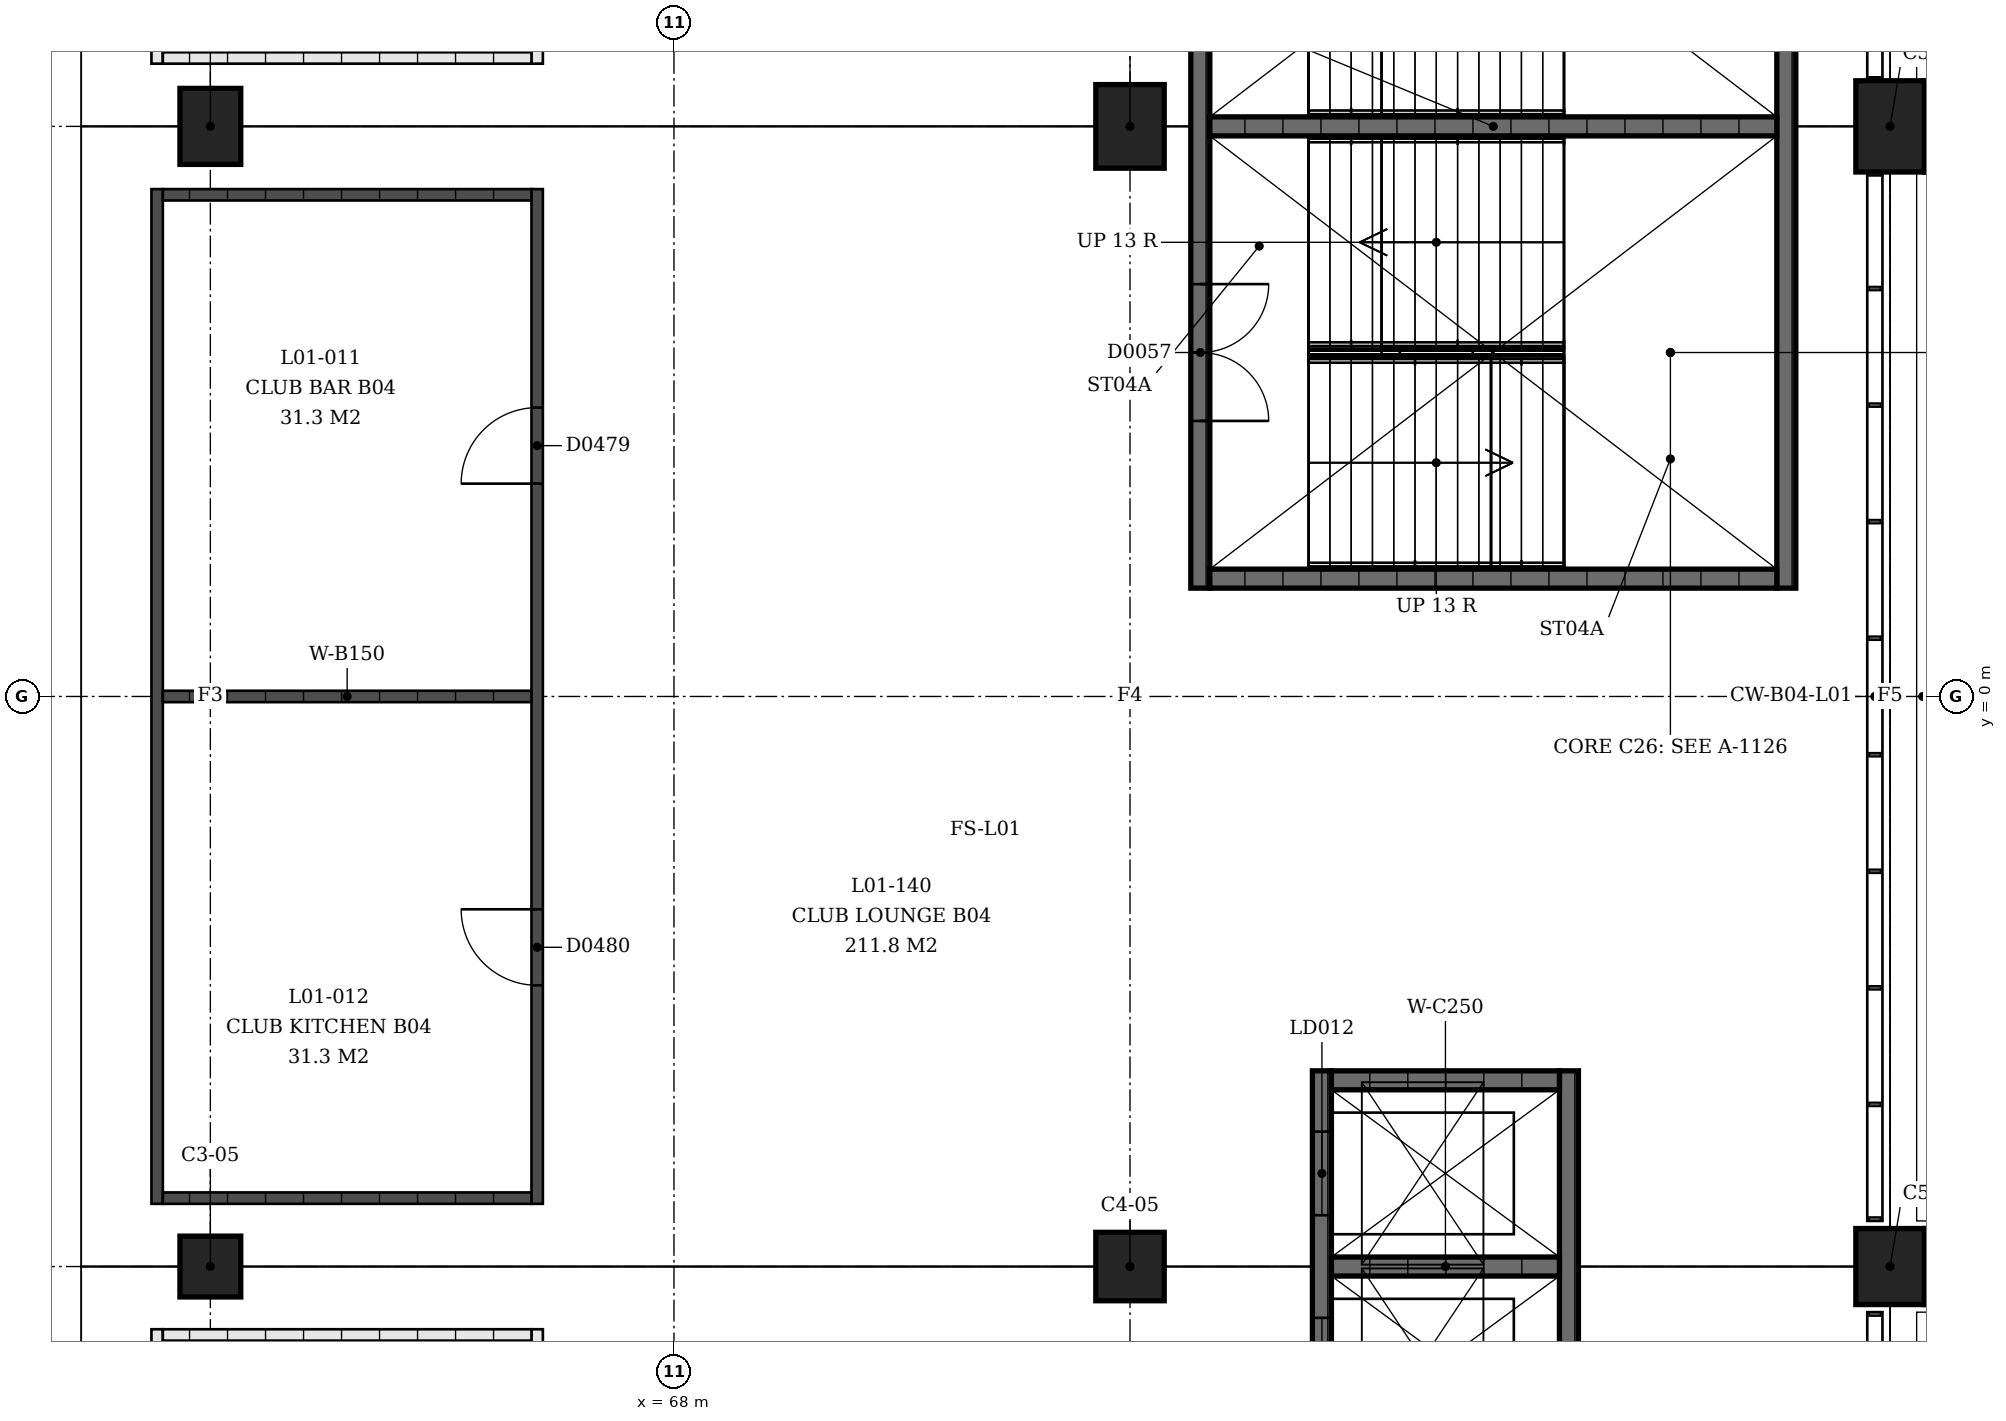
"""IFC4 building model, lengths in metres.
Left out: names, types, materials, properties, quantities, classifications, styles, units other than length and angle.
Written with IfcOpenShell. Run it as: python <this file> out.ifc"""

import sys

from ifc_helpers import new_model, si_unit, direction, frame, frame_2d, origin, origin_2d, place, context, subcontext, project, spatial, rectangle, extrude, element, fill, save


model = new_model("IFC4")
c1 = context("Model", 3, precision=1e-05, world=origin(), true_north=direction((0.0, 1.0)))
c2 = subcontext(c1, "Body", "Model", "MODEL_VIEW")
j1 = project(units=[si_unit("LENGTHUNIT", "METRE"), si_unit("PLANEANGLEUNIT", "RADIAN")], contexts=[c1])
p1 = place(None, origin())
s1 = spatial("IfcSite", under=j1, at=p1, CompositionType="ELEMENT")
p2 = place(p1, origin())
s2 = spatial("IfcBuilding", under=s1, at=p2, CompositionType="ELEMENT")
p3 = place(p2, frame((0.0, 0.0, 4.5)))
s3 = spatial("IfcBuildingStorey", under=s2, at=p3, CompositionType="ELEMENT", Elevation=4.5)
p4 = place(p3, frame((61.9, 7.5, 0.0), z_axis=(0.0, 0.0, 1.0), x_axis=(0.0, 1.0, 0.0)))
e1 = element("IfcColumn", 1, at=p4, inside=s3, PredefinedType="COLUMN", context=c2, shape_type="SweptSolid", body=[
    extrude(rectangle(XDim=1.0, YDim=0.8, at=origin_2d()), origin(), (0.0, 0.0, 1.0), 4.5),
])
p5 = place(p3, frame((74.0, 7.5, 0.0), z_axis=(0.0, 0.0, 1.0), x_axis=(0.0, 1.0, 0.0)))
e2 = element("IfcColumn", 2, at=p5, inside=s3, PredefinedType="COLUMN", context=c2, shape_type="SweptSolid", body=[
    extrude(rectangle(XDim=1.1, YDim=0.9, at=origin_2d()), origin(), (0.0, 0.0, 1.0), 4.5),
])
p6 = place(p3, frame((84.0, 7.5, 0.0), z_axis=(0.0, 0.0, 1.0), x_axis=(0.0, 1.0, 0.0)))
e3 = element("IfcColumn", 3, at=p6, inside=s3, PredefinedType="COLUMN", context=c2, shape_type="SweptSolid", body=[
    extrude(rectangle(XDim=1.2, YDim=0.9, at=origin_2d()), origin(), (0.0, 0.0, 1.0), 4.5),
])
p7 = place(p3, frame((61.9, -7.5, 0.0), z_axis=(0.0, 0.0, 1.0), x_axis=(0.0, 1.0, 0.0)))
e4 = element("IfcColumn", 4, at=p7, inside=s3, PredefinedType="COLUMN", context=c2, shape_type="SweptSolid", body=[
    extrude(rectangle(XDim=0.8, YDim=0.8, at=origin_2d()), origin(), (0.0, 0.0, 1.0), 4.5),
])
p8 = place(p3, frame((74.0, -7.5, 0.0), z_axis=(0.0, 0.0, 1.0), x_axis=(0.0, 1.0, 0.0)))
e5 = element("IfcColumn", 5, at=p8, inside=s3, PredefinedType="COLUMN", context=c2, shape_type="SweptSolid", body=[
    extrude(rectangle(XDim=0.9, YDim=0.9, at=origin_2d()), origin(), (0.0, 0.0, 1.0), 4.5),
])
p9 = place(p3, frame((84.0, -7.5, 0.0), z_axis=(0.0, 0.0, 1.0), x_axis=(0.0, 1.0, 0.0)))
e6 = element("IfcColumn", 6, at=p9, inside=s3, PredefinedType="COLUMN", context=c2, shape_type="SweptSolid", body=[
    extrude(rectangle(XDim=1.0, YDim=0.9, at=origin_2d()), origin(), (0.0, 0.0, 1.0), 4.5),
])
p10 = place(p3, frame((74.925, 1.425, 0.0), z_axis=(0.0, 0.0, 1.0), x_axis=(0.0, 1.0, 0.0)))
e7 = element("IfcWall", 7, at=p10, inside=s3, PredefinedType="SHEAR", context=c2, shape_type="SweptSolid", body=[
    extrude(rectangle(XDim=12.15, YDim=0.25, at=frame_2d((6.075, 0.0))), origin(), (0.0, 0.0, 1.0), 4.09),
])
p11 = place(p10, frame((2.2, 0.0, 0.0)))
e8 = element("IfcOpeningElement", 8, at=p11, cuts=e7, PredefinedType="OPENING", context=c2, shape_type="SweptSolid", body=[
    extrude(rectangle(XDim=1.8, YDim=2.1, at=frame_2d((0.9, 1.05))), frame((0.0, 0.125, 0.0), z_axis=(0.0, -1.0, 0.0), x_axis=(1.0, 0.0, 0.0)), (0.0, 0.0, 1.0), 0.25),
])
p12 = place(p10, frame((8.15, 0.0, 0.0)))
e9 = element("IfcOpeningElement", 9, at=p12, cuts=e7, PredefinedType="OPENING", context=c2, shape_type="SweptSolid", body=[
    extrude(rectangle(XDim=1.8, YDim=2.1, at=frame_2d((0.9, 1.05))), frame((0.0, 0.125, 0.0), z_axis=(0.0, -1.0, 0.0), x_axis=(1.0, 0.0, 0.0)), (0.0, 0.0, 1.0), 0.25),
])
p13 = place(p3, frame((82.635, 1.425, 0.0), z_axis=(0.0, 0.0, 1.0), x_axis=(0.0, 1.0, 0.0)))
e10 = element("IfcWall", 10, at=p13, inside=s3, PredefinedType="SHEAR", context=c2, shape_type="SweptSolid", body=[
    extrude(rectangle(XDim=12.15, YDim=0.25, at=frame_2d((6.075, 0.0))), origin(), (0.0, 0.0, 1.0), 4.09),
])
for number, where, z_axis, x_axis in (
    (11, (75.05, 1.55, 0.0), (0.0, 0.0, 1.0), (1.0, 0.0, 0.0)),
    (12, (75.05, 7.5, 0.0), (0.0, 0.0, 1.0), (1.0, 0.0, 0.0)),
):
    element("IfcWall", number, at=place(p3, frame(where, z_axis=z_axis, x_axis=x_axis)), inside=s3, PredefinedType="SHEAR", context=c2, shape_type="SweptSolid", body=[
        extrude(rectangle(XDim=7.46, YDim=0.25, at=frame_2d((3.73, 0.0))), origin(), (0.0, 0.0, 1.0), 4.09),
    ])
p14 = place(p3, frame((76.525, -10.075, 0.0), z_axis=(0.0, 0.0, 1.0), x_axis=(0.0, 1.0, 0.0)))
e13 = element("IfcWall", 13, at=p14, inside=s3, PredefinedType="SHEAR", context=c2, shape_type="SweptSolid", body=[
    extrude(rectangle(XDim=5.15, YDim=0.25, at=frame_2d((2.575, 0.0))), origin(), (0.0, 0.0, 1.0), 4.09),
])
p15 = place(p14, frame((0.8, 0.0, 0.0)))
e14 = element("IfcOpeningElement", 14, at=p15, cuts=e13, PredefinedType="OPENING", context=c2, shape_type="SweptSolid", body=[
    extrude(rectangle(XDim=1.1, YDim=2.1, at=frame_2d((0.55, 1.05))), frame((0.0, 0.125, 0.0), z_axis=(0.0, -1.0, 0.0), x_axis=(1.0, 0.0, 0.0)), (0.0, 0.0, 1.0), 0.25),
])
p16 = place(p14, frame((3.25, 0.0, 0.0)))
e15 = element("IfcOpeningElement", 15, at=p16, cuts=e13, PredefinedType="OPENING", context=c2, shape_type="SweptSolid", body=[
    extrude(rectangle(XDim=1.1, YDim=2.1, at=frame_2d((0.55, 1.05))), frame((0.0, 0.125, 0.0), z_axis=(0.0, -1.0, 0.0), x_axis=(1.0, 0.0, 0.0)), (0.0, 0.0, 1.0), 0.25),
])
p17 = place(p3, frame((79.775, -10.075, 0.0), z_axis=(0.0, 0.0, 1.0), x_axis=(0.0, 1.0, 0.0)))
e16 = element("IfcWall", 16, at=p17, inside=s3, PredefinedType="SHEAR", context=c2, shape_type="SweptSolid", body=[
    extrude(rectangle(XDim=5.15, YDim=0.25, at=frame_2d((2.575, 0.0))), origin(), (0.0, 0.0, 1.0), 4.09),
])
for number, where, z_axis, x_axis in (
    (17, (76.65, -5.05, 0.0), (0.0, 0.0, 1.0), (1.0, 0.0, 0.0)),
    (18, (76.65, -7.5, 0.0), (0.0, 0.0, 1.0), (1.0, 0.0, 0.0)),
):
    element("IfcWall", number, at=place(p3, frame(where, z_axis=z_axis, x_axis=x_axis)), inside=s3, PredefinedType="SHEAR", context=c2, shape_type="SweptSolid", body=[
        extrude(rectangle(XDim=3.0, YDim=0.25, at=frame_2d((1.5, 0.0))), origin(), (0.0, 0.0, 1.0), 4.09),
    ])
p18 = place(p3, frame((61.2, 8.325, 0.0), z_axis=(0.0, 0.0, 1.0), x_axis=(0.0, 1.0, 0.0)))
e19 = element("IfcWall", 19, at=p18, inside=s3, PredefinedType="PARTITIONING", context=c2, shape_type="SweptSolid", body=[
    extrude(rectangle(XDim=13.35, YDim=0.15, at=frame_2d((6.675, 0.0))), origin(), (0.0, 0.0, 1.0), 3.0),
])
p19 = place(p3, frame((66.2, 8.325, 0.0), z_axis=(0.0, 0.0, 1.0), x_axis=(0.0, 1.0, 0.0)))
e20 = element("IfcWall", 20, at=p19, inside=s3, PredefinedType="PARTITIONING", context=c2, shape_type="SweptSolid", body=[
    extrude(rectangle(XDim=13.35, YDim=0.15, at=frame_2d((6.675, 0.0))), origin(), (0.0, 0.0, 1.0), 3.0),
])
p20 = place(p19, frame((1.671, 0.0, 0.0)))
e21 = element("IfcOpeningElement", 21, at=p20, cuts=e20, PredefinedType="OPENING", context=c2, shape_type="SweptSolid", body=[
    extrude(rectangle(XDim=0.9, YDim=2.1, at=frame_2d((0.45, 1.05))), frame((0.0, 0.075, 0.0), z_axis=(0.0, -1.0, 0.0), x_axis=(1.0, 0.0, 0.0)), (0.0, 0.0, 1.0), 0.15),
])
p21 = place(p19, frame((5.763, 0.0, 0.0)))
e22 = element("IfcOpeningElement", 22, at=p21, cuts=e20, PredefinedType="OPENING", context=c2, shape_type="SweptSolid", body=[
    extrude(rectangle(XDim=0.9, YDim=2.1, at=frame_2d((0.45, 1.05))), frame((0.0, 0.075, 0.0), z_axis=(0.0, -1.0, 0.0), x_axis=(1.0, 0.0, 0.0)), (0.0, 0.0, 1.0), 0.15),
])
p22 = place(p19, frame((8.963, 0.0, 0.0)))
e23 = element("IfcOpeningElement", 23, at=p22, cuts=e20, PredefinedType="OPENING", context=c2, shape_type="SweptSolid", body=[
    extrude(rectangle(XDim=1.1, YDim=2.1, at=frame_2d((0.55, 1.05))), frame((0.0, 0.075, 0.0), z_axis=(0.0, -1.0, 0.0), x_axis=(1.0, 0.0, 0.0)), (0.0, 0.0, 1.0), 0.15),
])
p23 = place(p19, frame((11.471, 0.0, 0.0)))
e24 = element("IfcOpeningElement", 24, at=p23, cuts=e20, PredefinedType="OPENING", context=c2, shape_type="SweptSolid", body=[
    extrude(rectangle(XDim=1.1, YDim=2.1, at=frame_2d((0.55, 1.05))), frame((0.0, 0.075, 0.0), z_axis=(0.0, -1.0, 0.0), x_axis=(1.0, 0.0, 0.0)), (0.0, 0.0, 1.0), 0.15),
])
p24 = place(p3, frame((61.275, 8.4, 0.0), z_axis=(0.0, 0.0, 1.0), x_axis=(1.0, 0.0, 0.0)))
e25 = element("IfcWall", 25, at=p24, inside=s3, PredefinedType="PARTITIONING", context=c2, shape_type="SweptSolid", body=[
    extrude(rectangle(XDim=4.85, YDim=0.15, at=frame_2d((2.425, 0.0))), origin(), (0.0, 0.0, 1.0), 3.0),
])
p25 = place(p3, frame((61.2, 6.675, 0.0), z_axis=(0.0, 0.0, 1.0), x_axis=(0.0, -1.0, 0.0)))
e26 = element("IfcWall", 26, at=p25, inside=s3, PredefinedType="SOLIDWALL", context=c2, shape_type="SweptSolid", body=[
    extrude(rectangle(XDim=13.35, YDim=0.15, at=frame_2d((6.675, 0.0))), origin(), (0.0, 0.0, 1.0), 3.0),
])
p26 = place(p3, frame((66.2, 6.675, 0.0), z_axis=(0.0, 0.0, 1.0), x_axis=(0.0, -1.0, 0.0)))
e27 = element("IfcWall", 27, at=p26, inside=s3, PredefinedType="SOLIDWALL", context=c2, shape_type="SweptSolid", body=[
    extrude(rectangle(XDim=13.35, YDim=0.15, at=frame_2d((6.675, 0.0))), origin(), (0.0, 0.0, 1.0), 3.0),
])
p27 = place(p26, frame((2.875, 0.0, 0.0)))
e28 = element("IfcOpeningElement", 28, at=p27, cuts=e27, PredefinedType="OPENING", context=c2, shape_type="SweptSolid", body=[
    extrude(rectangle(XDim=1.0, YDim=2.1, at=frame_2d((0.5, 1.05))), frame((0.0, 0.075, 0.0), z_axis=(0.0, -1.0, 0.0), x_axis=(1.0, 0.0, 0.0)), (0.0, 0.0, 1.0), 0.15),
])
p28 = place(p26, frame((9.475, 0.0, 0.0)))
e29 = element("IfcOpeningElement", 29, at=p28, cuts=e27, PredefinedType="OPENING", context=c2, shape_type="SweptSolid", body=[
    extrude(rectangle(XDim=1.0, YDim=2.1, at=frame_2d((0.5, 1.05))), frame((0.0, 0.075, 0.0), z_axis=(0.0, -1.0, 0.0), x_axis=(1.0, 0.0, 0.0)), (0.0, 0.0, 1.0), 0.15),
])
for number, where, z_axis, x_axis in (
    (30, (61.275, 6.6, 0.0), (0.0, 0.0, 1.0), (1.0, 0.0, 0.0)),
    (31, (61.275, 0.0, 0.0), (0.0, 0.0, 1.0), (1.0, 0.0, 0.0)),
    (32, (61.275, -6.6, 0.0), (0.0, 0.0, 1.0), (1.0, 0.0, 0.0)),
):
    element("IfcWall", number, at=place(p3, frame(where, z_axis=z_axis, x_axis=x_axis)), inside=s3, PredefinedType="SOLIDWALL", context=c2, shape_type="SweptSolid", body=[
        extrude(rectangle(XDim=4.85, YDim=0.15, at=frame_2d((2.425, 0.0))), origin(), (0.0, 0.0, 1.0), 3.0),
    ])
p29 = place(p3, frame((61.2, -21.675, 0.0), z_axis=(0.0, 0.0, 1.0), x_axis=(0.0, 1.0, 0.0)))
e33 = element("IfcWall", 33, at=p29, inside=s3, PredefinedType="PARTITIONING", context=c2, shape_type="SweptSolid", body=[
    extrude(rectangle(XDim=13.35, YDim=0.15, at=frame_2d((6.675, 0.0))), origin(), (0.0, 0.0, 1.0), 3.0),
])
p30 = place(p3, frame((66.2, -21.675, 0.0), z_axis=(0.0, 0.0, 1.0), x_axis=(0.0, 1.0, 0.0)))
e34 = element("IfcWall", 34, at=p30, inside=s3, PredefinedType="PARTITIONING", context=c2, shape_type="SweptSolid", body=[
    extrude(rectangle(XDim=13.35, YDim=0.15, at=frame_2d((6.675, 0.0))), origin(), (0.0, 0.0, 1.0), 3.0),
])
p31 = place(p30, frame((1.671, 0.0, 0.0)))
e35 = element("IfcOpeningElement", 35, at=p31, cuts=e34, PredefinedType="OPENING", context=c2, shape_type="SweptSolid", body=[
    extrude(rectangle(XDim=0.9, YDim=2.1, at=frame_2d((0.45, 1.05))), frame((0.0, 0.075, 0.0), z_axis=(0.0, -1.0, 0.0), x_axis=(1.0, 0.0, 0.0)), (0.0, 0.0, 1.0), 0.15),
])
p32 = place(p30, frame((5.763, 0.0, 0.0)))
e36 = element("IfcOpeningElement", 36, at=p32, cuts=e34, PredefinedType="OPENING", context=c2, shape_type="SweptSolid", body=[
    extrude(rectangle(XDim=0.9, YDim=2.1, at=frame_2d((0.45, 1.05))), frame((0.0, 0.075, 0.0), z_axis=(0.0, -1.0, 0.0), x_axis=(1.0, 0.0, 0.0)), (0.0, 0.0, 1.0), 0.15),
])
p33 = place(p30, frame((8.963, 0.0, 0.0)))
e37 = element("IfcOpeningElement", 37, at=p33, cuts=e34, PredefinedType="OPENING", context=c2, shape_type="SweptSolid", body=[
    extrude(rectangle(XDim=1.1, YDim=2.1, at=frame_2d((0.55, 1.05))), frame((0.0, 0.075, 0.0), z_axis=(0.0, -1.0, 0.0), x_axis=(1.0, 0.0, 0.0)), (0.0, 0.0, 1.0), 0.15),
])
p34 = place(p30, frame((11.471, 0.0, 0.0)))
e38 = element("IfcOpeningElement", 38, at=p34, cuts=e34, PredefinedType="OPENING", context=c2, shape_type="SweptSolid", body=[
    extrude(rectangle(XDim=1.1, YDim=2.1, at=frame_2d((0.55, 1.05))), frame((0.0, 0.075, 0.0), z_axis=(0.0, -1.0, 0.0), x_axis=(1.0, 0.0, 0.0)), (0.0, 0.0, 1.0), 0.15),
])
p35 = place(p3, frame((61.275, -8.4, 0.0), z_axis=(0.0, 0.0, 1.0), x_axis=(1.0, 0.0, 0.0)))
e39 = element("IfcWall", 39, at=p35, inside=s3, PredefinedType="PARTITIONING", context=c2, shape_type="SweptSolid", body=[
    extrude(rectangle(XDim=4.85, YDim=0.15, at=frame_2d((2.425, 0.0))), origin(), (0.0, 0.0, 1.0), 3.0),
])
p36 = place(p11, origin())
e40 = element("IfcDoor", 40, at=p36, inside=s3, OperationType="DOUBLE_DOOR_SINGLE_SWING", PredefinedType="DOOR", context=c2, shape_type="SweptSolid", body=[
    extrude(rectangle(XDim=1.8, YDim=2.1, at=frame_2d((0.9, 1.05))), frame((0.0, 0.025, 0.0), z_axis=(0.0, -1.0, 0.0), x_axis=(1.0, 0.0, 0.0)), (0.0, 0.0, 1.0), 0.05),
])
fill(e8, e40)
p37 = place(p15, origin())
e41 = element("IfcDoor", 41, at=p37, inside=s3, OperationType="SLIDING_TO_LEFT", PredefinedType="DOOR", context=c2, shape_type="SweptSolid", body=[
    extrude(rectangle(XDim=1.1, YDim=2.1, at=frame_2d((0.55, 1.05))), frame((0.0, 0.025, 0.0), z_axis=(0.0, -1.0, 0.0), x_axis=(1.0, 0.0, 0.0)), (0.0, 0.0, 1.0), 0.05),
])
fill(e14, e41)
p38 = place(p16, origin())
e42 = element("IfcDoor", 42, at=p38, inside=s3, OperationType="SLIDING_TO_LEFT", PredefinedType="DOOR", context=c2, shape_type="SweptSolid", body=[
    extrude(rectangle(XDim=1.1, YDim=2.1, at=frame_2d((0.55, 1.05))), frame((0.0, 0.025, 0.0), z_axis=(0.0, -1.0, 0.0), x_axis=(1.0, 0.0, 0.0)), (0.0, 0.0, 1.0), 0.05),
])
fill(e15, e42)
p39 = place(p27, origin())
e43 = element("IfcDoor", 43, at=p39, inside=s3, OperationType="SINGLE_SWING_RIGHT", PredefinedType="DOOR", context=c2, shape_type="SweptSolid", body=[
    extrude(rectangle(XDim=1.0, YDim=2.1, at=frame_2d((0.5, 1.05))), frame((0.0, 0.025, 0.0), z_axis=(0.0, -1.0, 0.0), x_axis=(1.0, 0.0, 0.0)), (0.0, 0.0, 1.0), 0.05),
])
fill(e28, e43)
p40 = place(p28, origin())
e44 = element("IfcDoor", 44, at=p40, inside=s3, OperationType="SINGLE_SWING_LEFT", PredefinedType="DOOR", context=c2, shape_type="SweptSolid", body=[
    extrude(rectangle(XDim=1.0, YDim=2.1, at=frame_2d((0.5, 1.05))), frame((0.0, 0.025, 0.0), z_axis=(0.0, -1.0, 0.0), x_axis=(1.0, 0.0, 0.0)), (0.0, 0.0, 1.0), 0.05),
])
fill(e29, e44)
save(model, sys.argv[1])
